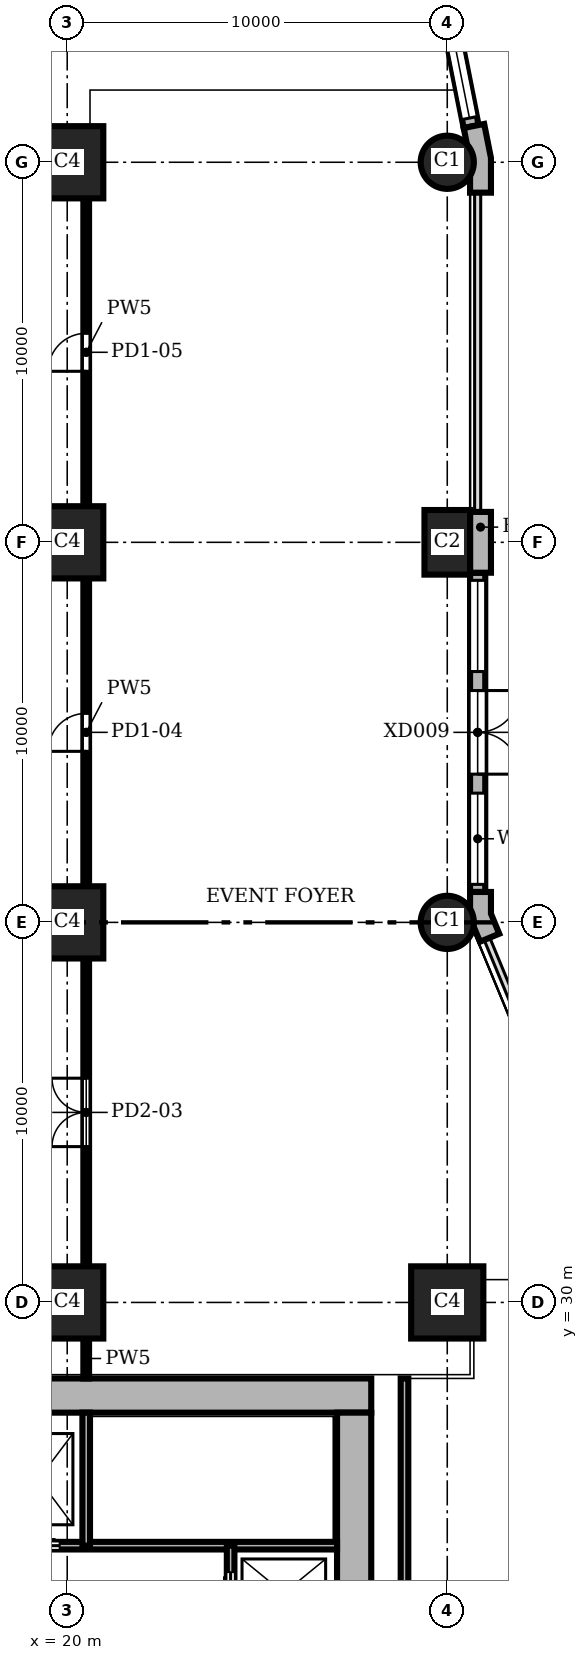
"""IFC4 building model, lengths in metres.
Left out: names, types, materials, properties, quantities, classifications, styles, units other than length and angle.
Written with IfcOpenShell. Run it as: python <this file> out.ifc"""

import sys

from ifc_helpers import new_model, si_unit, direction, frame, frame_2d, origin, origin_2d, place, context, subcontext, project, spatial, polyline, rectangle, circle, outline, extrude, element, fill, save


model = new_model("IFC4")
c1 = context("Model", 3, precision=1e-05, world=origin(), true_north=direction((0.0, 1.0)))
c2 = subcontext(c1, "Body", "Model", "MODEL_VIEW")
j1 = project(units=[si_unit("LENGTHUNIT", "METRE"), si_unit("PLANEANGLEUNIT", "RADIAN")], contexts=[c1])
p1 = place(None, origin())
s1 = spatial("IfcSite", under=j1, at=p1, CompositionType="ELEMENT")
p2 = place(p1, origin())
s2 = spatial("IfcBuilding", under=s1, at=p2, CompositionType="ELEMENT")
p3 = place(p2, frame((0.0, 0.0, 6.0)))
s3 = spatial("IfcBuildingStorey", under=s2, at=p3, CompositionType="ELEMENT", Elevation=6.0)
p4 = place(p3, frame((30.0, 40.0, 0.0), z_axis=(0.0, 0.0, 1.0), x_axis=(1.0, 0.0, 0.0)))
e1 = element("IfcColumn", 1, at=p4, inside=s3, PredefinedType="COLUMN", context=c2, shape_type="SweptSolid", body=[
    extrude(circle(Radius=0.7, at=origin_2d()), origin(), (0.0, 0.0, 1.0), 6.0),
])
p5 = place(p3, frame((30.0, 50.0, 0.0), z_axis=(0.0, 0.0, 1.0), x_axis=(0.0, 1.0, 0.0)))
e2 = element("IfcColumn", 2, at=p5, inside=s3, PredefinedType="COLUMN", context=c2, shape_type="SweptSolid", body=[
    extrude(rectangle(XDim=1.7, YDim=1.2, at=origin_2d()), origin(), (0.0, 0.0, 1.0), 6.0),
])
p6 = place(p3, frame((30.0, 60.0, 0.0), z_axis=(0.0, 0.0, 1.0), x_axis=(1.0, 0.0, 0.0)))
e3 = element("IfcColumn", 3, at=p6, inside=s3, PredefinedType="COLUMN", context=c2, shape_type="SweptSolid", body=[
    extrude(circle(Radius=0.7, at=origin_2d()), origin(), (0.0, 0.0, 1.0), 6.0),
])
for number, where, z_axis, x_axis in (
    (4, (20.0, 30.0, 0.0), (0.0, 0.0, 1.0), (1.0, 0.0, 0.0)),
    (5, (20.0, 40.0, 0.0), (0.0, 0.0, 1.0), (1.0, 0.0, 0.0)),
    (6, (20.0, 50.0, 0.0), (0.0, 0.0, 1.0), (1.0, 0.0, 0.0)),
    (7, (20.0, 60.0, 0.0), (0.0, 0.0, 1.0), (1.0, 0.0, 0.0)),
    (8, (30.0, 30.0, 0.0), (0.0, 0.0, 1.0), (1.0, 0.0, 0.0)),
):
    element("IfcColumn", number, at=place(p3, frame(where, z_axis=z_axis, x_axis=x_axis)), inside=s3, PredefinedType="COLUMN", context=c2, shape_type="SweptSolid", body=[
        extrude(rectangle(XDim=1.9, YDim=1.9, at=origin_2d()), origin(), (0.0, 0.0, 1.0), 6.0),
    ])
p7 = place(p3, frame((27.55, 8.9, 0.0), z_axis=(0.0, 0.0, 1.0), x_axis=(0.0, 1.0, 0.0)))
e9 = element("IfcWall", 9, at=p7, inside=s3, PredefinedType="SHEAR", context=c2, shape_type="SweptSolid", body=[
    extrude(rectangle(XDim=18.2, YDim=0.9, at=frame_2d((9.1, 0.0))), origin(), (0.0, 0.0, 1.0), 6.0),
])
p8 = place(p7, frame((4.55, 0.0, 0.0)))
e10 = element("IfcOpeningElement", 10, at=p8, cuts=e9, PredefinedType="OPENING", context=c2, shape_type="SweptSolid", body=[
    extrude(rectangle(XDim=1.6, YDim=2.1, at=frame_2d((0.8, 1.05))), frame((0.0, 0.46, 0.0), z_axis=(0.0, -1.0, 0.0), x_axis=(1.0, 0.0, 0.0)), (0.0, 0.0, 1.0), 0.92),
])
p9 = place(p3, frame((28.0, 27.55, 0.0), z_axis=(0.0, 0.0, 1.0), x_axis=(-1.0, 0.0, 0.0)))
e11 = element("IfcWall", 11, at=p9, inside=s3, PredefinedType="SHEAR", context=c2, shape_type="SweptSolid", body=[
    extrude(rectangle(XDim=20.0, YDim=0.9, at=frame_2d((10.0, 0.0))), origin(), (0.0, 0.0, 1.0), 6.0),
])
p10 = place(p3, origin())
e12 = element("IfcWall", 12, at=p10, inside=s3, PredefinedType="SOLIDWALL", context=c2, shape_type="SweptSolid", body=[
    extrude(outline(polyline([(31.23, 39.644), (31.369, 39.701), (31.15, 40.229), (31.15, 40.8), (31.0, 40.8), (30.6, 40.8), (30.6, 40.119), (30.861, 39.49), (31.23, 39.644)])), origin(), (0.0, 0.0, 1.0), 6.0),
])
e13 = element("IfcWall", 13, at=p10, inside=s3, PredefinedType="SOLIDWALL", context=c2, shape_type="SweptSolid", body=[
    extrude(outline(polyline([(31.0, 49.2), (31.15, 49.2), (31.15, 50.0), (31.15, 50.8), (31.0, 50.8), (30.6, 50.8), (30.6, 50.0), (30.6, 49.2), (31.0, 49.2)])), origin(), (0.0, 0.0, 1.0), 6.0),
])
e14 = element("IfcWall", 14, at=p10, inside=s3, PredefinedType="SOLIDWALL", context=c2, shape_type="SweptSolid", body=[
    extrude(outline(polyline([(31.0, 59.2), (31.15, 59.2), (31.15, 60.113), (30.972, 61.009), (30.825, 60.98), (30.432, 60.902), (30.6, 60.059), (30.6, 59.2), (31.0, 59.2)])), origin(), (0.0, 0.0, 1.0), 6.0),
])
p11 = place(p3, frame((30.8, 40.8, 0.0), z_axis=(0.0, 0.0, 1.0), x_axis=(0.0, 1.0, 0.0)))
e15 = element("IfcWall", 15, at=p11, inside=s3, PredefinedType="SOLIDWALL", context=c2, shape_type="SweptSolid", body=[
    extrude(rectangle(XDim=8.4, YDim=0.4, at=frame_2d((4.2, 0.0))), origin(), (0.0, 0.0, 1.0), 6.0),
])
p12 = place(p11, frame((0.2, 0.0, 0.9)))
e16 = element("IfcOpeningElement", 16, at=p12, cuts=e15, PredefinedType="OPENING", context=c2, shape_type="SweptSolid", body=[
    extrude(rectangle(XDim=2.4, YDim=4.4, at=frame_2d((1.2, 2.2))), frame((0.0, 0.21, 0.0), z_axis=(0.0, -1.0, 0.0), x_axis=(1.0, 0.0, 0.0)), (0.0, 0.0, 1.0), 0.42),
])
p13 = place(p11, frame((3.1, 0.0, 0.0)))
e17 = element("IfcOpeningElement", 17, at=p13, cuts=e15, PredefinedType="OPENING", context=c2, shape_type="SweptSolid", body=[
    extrude(rectangle(XDim=2.2, YDim=2.4, at=frame_2d((1.1, 1.2))), frame((0.0, 0.21, 0.0), z_axis=(0.0, -1.0, 0.0), x_axis=(1.0, 0.0, 0.0)), (0.0, 0.0, 1.0), 0.42),
])
p14 = place(p11, frame((5.8, 0.0, 0.9)))
e18 = element("IfcOpeningElement", 18, at=p14, cuts=e15, PredefinedType="OPENING", context=c2, shape_type="SweptSolid", body=[
    extrude(rectangle(XDim=2.4, YDim=4.4, at=frame_2d((1.2, 2.2))), frame((0.0, 0.21, 0.0), z_axis=(0.0, -1.0, 0.0), x_axis=(1.0, 0.0, 0.0)), (0.0, 0.0, 1.0), 0.42),
])
p15 = place(p3, frame((30.629, 60.941, 0.0), z_axis=(0.0, 0.0, 1.0), x_axis=(-0.195098533057, 0.98078364709, 0.0)))
e19 = element("IfcWall", 19, at=p15, inside=s3, PredefinedType="SOLIDWALL", context=c2, shape_type="SweptSolid", body=[
    extrude(rectangle(XDim=4.753, YDim=0.4, at=frame_2d((2.376, 0.0))), origin(), (0.0, 0.0, 1.0), 6.0),
])
p16 = place(p15, frame((0.226, 0.0, 0.9)))
e20 = element("IfcOpeningElement", 20, at=p16, cuts=e19, PredefinedType="OPENING", context=c2, shape_type="SweptSolid", body=[
    extrude(rectangle(XDim=4.3, YDim=4.4, at=frame_2d((2.15, 2.2))), frame((0.0, 0.21, 0.0), z_axis=(0.0, -1.0, 0.0), x_axis=(1.0, 0.0, 0.0)), (0.0, 0.0, 1.0), 0.42),
])
p17 = place(p3, frame((13.8, 23.6, 0.0), z_axis=(0.0, 0.0, 1.0), x_axis=(1.0, 0.0, 0.0)))
e21 = element("IfcWall", 21, at=p17, inside=s3, PredefinedType="SHEAR", context=c2, shape_type="SweptSolid", body=[
    extrude(rectangle(XDim=13.3, YDim=0.2, at=frame_2d((6.65, 0.0))), origin(), (0.0, 0.0, 1.0), 5.68),
])
p18 = place(p17, frame((2.4, 0.0, 0.0)))
e22 = element("IfcOpeningElement", 22, at=p18, cuts=e21, PredefinedType="OPENING", context=c2, shape_type="SweptSolid", body=[
    extrude(rectangle(XDim=1.1, YDim=2.1, at=frame_2d((0.55, 1.05))), frame((0.0, 0.11, 0.0), z_axis=(0.0, -1.0, 0.0), x_axis=(1.0, 0.0, 0.0)), (0.0, 0.0, 1.0), 0.22),
])
p19 = place(p17, frame((4.9, 0.0, 0.0)))
e23 = element("IfcOpeningElement", 23, at=p19, cuts=e21, PredefinedType="OPENING", context=c2, shape_type="SweptSolid", body=[
    extrude(rectangle(XDim=1.1, YDim=2.1, at=frame_2d((0.55, 1.05))), frame((0.0, 0.11, 0.0), z_axis=(0.0, -1.0, 0.0), x_axis=(1.0, 0.0, 0.0)), (0.0, 0.0, 1.0), 0.22),
])
p20 = place(p17, frame((0.25, 0.0, 0.0)))
e24 = element("IfcOpeningElement", 24, at=p20, cuts=e21, PredefinedType="OPENING", context=c2, shape_type="SweptSolid", body=[
    extrude(rectangle(XDim=1.0, YDim=2.1, at=frame_2d((0.5, 1.05))), frame((0.0, 0.11, 0.0), z_axis=(0.0, -1.0, 0.0), x_axis=(1.0, 0.0, 0.0)), (0.0, 0.0, 1.0), 0.22),
])
p21 = place(p3, frame((20.5, 23.6, 0.0), z_axis=(0.0, 0.0, 1.0), x_axis=(0.0, 1.0, 0.0)))
e25 = element("IfcWall", 25, at=p21, inside=s3, PredefinedType="SHEAR", context=c2, shape_type="SweptSolid", body=[
    extrude(rectangle(XDim=3.5, YDim=0.2, at=frame_2d((1.75, 0.0))), origin(), (0.0, 0.0, 1.0), 5.68),
])
p22 = place(p3, frame((24.3, 16.1, 0.0), z_axis=(0.0, 0.0, 1.0), x_axis=(0.0, 1.0, 0.0)))
e26 = element("IfcWall", 26, at=p22, inside=s3, PredefinedType="SHEAR", context=c2, shape_type="SweptSolid", body=[
    extrude(rectangle(XDim=7.5, YDim=0.2, at=frame_2d((3.75, 0.0))), origin(), (0.0, 0.0, 1.0), 5.68),
])
p23 = place(p22, frame((5.7, 0.0, 0.0)))
e27 = element("IfcOpeningElement", 27, at=p23, cuts=e26, PredefinedType="OPENING", context=c2, shape_type="SweptSolid", body=[
    extrude(rectangle(XDim=1.1, YDim=2.1, at=frame_2d((0.55, 1.05))), frame((0.0, 0.11, 0.0), z_axis=(0.0, -1.0, 0.0), x_axis=(1.0, 0.0, 0.0)), (0.0, 0.0, 1.0), 0.22),
])
p24 = place(p3, frame((28.875, 16.5, 0.0), z_axis=(0.0, 0.0, 1.0), x_axis=(0.0, 1.0, 0.0)))
e28 = element("IfcWall", 28, at=p24, inside=s3, PredefinedType="PARTITIONING", context=c2, shape_type="SweptSolid", body=[
    extrude(rectangle(XDim=11.5, YDim=0.2, at=frame_2d((5.75, 0.0))), origin(), (0.0, 0.0, 1.0), 5.68),
])
p25 = place(p3, frame((20.5, 28.0, 0.0), z_axis=(0.0, 0.0, 1.0), x_axis=(0.0, 1.0, 0.0)))
e29 = element("IfcWall", 29, at=p25, inside=s3, PredefinedType="PARTITIONING", context=c2, shape_type="SweptSolid", body=[
    extrude(rectangle(XDim=1.05, YDim=0.15, at=frame_2d((0.525, 0.0))), origin(), (0.0, 0.0, 1.0), 5.68),
])
p26 = place(p3, frame((20.5, 30.95, 0.0), z_axis=(0.0, 0.0, 1.0), x_axis=(0.0, 1.0, 0.0)))
e30 = element("IfcWall", 30, at=p26, inside=s3, PredefinedType="PARTITIONING", context=c2, shape_type="SweptSolid", body=[
    extrude(rectangle(XDim=8.1, YDim=0.15, at=frame_2d((4.05, 0.0))), origin(), (0.0, 0.0, 1.0), 5.68),
])
p27 = place(p26, frame((3.15, 0.0, 0.0)))
e31 = element("IfcOpeningElement", 31, at=p27, cuts=e30, PredefinedType="OPENING", context=c2, shape_type="SweptSolid", body=[
    extrude(rectangle(XDim=1.8, YDim=2.1, at=frame_2d((0.9, 1.05))), frame((0.0, 0.085, 0.0), z_axis=(0.0, -1.0, 0.0), x_axis=(1.0, 0.0, 0.0)), (0.0, 0.0, 1.0), 0.17),
])
p28 = place(p3, frame((20.5, 40.95, 0.0), z_axis=(0.0, 0.0, 1.0), x_axis=(0.0, 1.0, 0.0)))
e32 = element("IfcWall", 32, at=p28, inside=s3, PredefinedType="PARTITIONING", context=c2, shape_type="SweptSolid", body=[
    extrude(rectangle(XDim=8.1, YDim=0.15, at=frame_2d((4.05, 0.0))), origin(), (0.0, 0.0, 1.0), 5.68),
])
p29 = place(p28, frame((3.55, 0.0, 0.0)))
e33 = element("IfcOpeningElement", 33, at=p29, cuts=e32, PredefinedType="OPENING", context=c2, shape_type="SweptSolid", body=[
    extrude(rectangle(XDim=1.0, YDim=2.1, at=frame_2d((0.5, 1.05))), frame((0.0, 0.085, 0.0), z_axis=(0.0, -1.0, 0.0), x_axis=(1.0, 0.0, 0.0)), (0.0, 0.0, 1.0), 0.17),
])
p30 = place(p3, frame((20.5, 50.95, 0.0), z_axis=(0.0, 0.0, 1.0), x_axis=(0.0, 1.0, 0.0)))
e34 = element("IfcWall", 34, at=p30, inside=s3, PredefinedType="PARTITIONING", context=c2, shape_type="SweptSolid", body=[
    extrude(rectangle(XDim=8.1, YDim=0.15, at=frame_2d((4.05, 0.0))), origin(), (0.0, 0.0, 1.0), 5.68),
])
p31 = place(p30, frame((3.55, 0.0, 0.0)))
e35 = element("IfcOpeningElement", 35, at=p31, cuts=e34, PredefinedType="OPENING", context=c2, shape_type="SweptSolid", body=[
    extrude(rectangle(XDim=1.0, YDim=2.1, at=frame_2d((0.5, 1.05))), frame((0.0, 0.085, 0.0), z_axis=(0.0, -1.0, 0.0), x_axis=(1.0, 0.0, 0.0)), (0.0, 0.0, 1.0), 0.17),
])
p32 = place(p12, origin())
e36 = element("IfcWindow", 36, at=p32, inside=s3, PartitioningType="SINGLE_PANEL", PredefinedType="WINDOW", context=c2, shape_type="SweptSolid", body=[
    extrude(rectangle(XDim=2.4, YDim=4.4, at=frame_2d((1.2, 2.2))), frame((0.0, 0.16, 0.0), z_axis=(0.0, -1.0, 0.0), x_axis=(1.0, 0.0, 0.0)), (0.0, 0.0, 1.0), 0.06),
])
fill(e16, e36)
p33 = place(p13, frame((2.2, 0.0, 0.0), z_axis=(0.0, 0.0, 1.0), x_axis=(-1.0, 0.0, 0.0)))
e37 = element("IfcDoor", 37, at=p33, inside=s3, OperationType="DOUBLE_DOOR_DOUBLE_SWING", PredefinedType="DOOR", context=c2, shape_type="SweptSolid", body=[
    extrude(rectangle(XDim=2.2, YDim=2.4, at=frame_2d((1.1, 1.2))), frame((0.0, 0.025, 0.0), z_axis=(0.0, -1.0, 0.0), x_axis=(1.0, 0.0, 0.0)), (0.0, 0.0, 1.0), 0.05),
])
fill(e17, e37)
p34 = place(p14, origin())
e38 = element("IfcWindow", 38, at=p34, inside=s3, PartitioningType="SINGLE_PANEL", PredefinedType="WINDOW", context=c2, shape_type="SweptSolid", body=[
    extrude(rectangle(XDim=2.4, YDim=4.4, at=frame_2d((1.2, 2.2))), frame((0.0, 0.16, 0.0), z_axis=(0.0, -1.0, 0.0), x_axis=(1.0, 0.0, 0.0)), (0.0, 0.0, 1.0), 0.06),
])
fill(e18, e38)
p35 = place(p16, origin())
e39 = element("IfcWindow", 39, at=p35, inside=s3, PartitioningType="SINGLE_PANEL", PredefinedType="WINDOW", context=c2, shape_type="SweptSolid", body=[
    extrude(rectangle(XDim=4.3, YDim=4.4, at=frame_2d((2.15, 2.2))), frame((0.0, 0.16, 0.0), z_axis=(0.0, -1.0, 0.0), x_axis=(1.0, 0.0, 0.0)), (0.0, 0.0, 1.0), 0.06),
])
fill(e20, e39)
p36 = place(p23, origin())
e40 = element("IfcDoor", 40, at=p36, inside=s3, OperationType="DOUBLE_DOOR_SLIDING", PredefinedType="DOOR", context=c2, shape_type="SweptSolid", body=[
    extrude(rectangle(XDim=1.1, YDim=2.1, at=frame_2d((0.55, 1.05))), frame((0.0, 0.025, 0.0), z_axis=(0.0, -1.0, 0.0), x_axis=(1.0, 0.0, 0.0)), (0.0, 0.0, 1.0), 0.05),
])
fill(e27, e40)
p37 = place(p19, origin())
e41 = element("IfcDoor", 41, at=p37, inside=s3, OperationType="DOUBLE_DOOR_SLIDING", PredefinedType="DOOR", context=c2, shape_type="SweptSolid", body=[
    extrude(rectangle(XDim=1.1, YDim=2.1, at=frame_2d((0.55, 1.05))), frame((0.0, 0.025, 0.0), z_axis=(0.0, -1.0, 0.0), x_axis=(1.0, 0.0, 0.0)), (0.0, 0.0, 1.0), 0.05),
])
fill(e23, e41)
p38 = place(p27, origin())
e42 = element("IfcDoor", 42, at=p38, inside=s3, OperationType="DOUBLE_DOOR_SINGLE_SWING", PredefinedType="DOOR", context=c2, shape_type="SweptSolid", body=[
    extrude(rectangle(XDim=1.8, YDim=2.1, at=frame_2d((0.9, 1.05))), frame((0.0, 0.025, 0.0), z_axis=(0.0, -1.0, 0.0), x_axis=(1.0, 0.0, 0.0)), (0.0, 0.0, 1.0), 0.05),
])
fill(e31, e42)
p39 = place(p29, origin())
e43 = element("IfcDoor", 43, at=p39, inside=s3, OperationType="SINGLE_SWING_LEFT", PredefinedType="DOOR", context=c2, shape_type="SweptSolid", body=[
    extrude(rectangle(XDim=1.0, YDim=2.1, at=frame_2d((0.5, 1.05))), frame((0.0, 0.025, 0.0), z_axis=(0.0, -1.0, 0.0), x_axis=(1.0, 0.0, 0.0)), (0.0, 0.0, 1.0), 0.05),
])
fill(e33, e43)
p40 = place(p31, origin())
e44 = element("IfcDoor", 44, at=p40, inside=s3, OperationType="SINGLE_SWING_LEFT", PredefinedType="DOOR", context=c2, shape_type="SweptSolid", body=[
    extrude(rectangle(XDim=1.0, YDim=2.1, at=frame_2d((0.5, 1.05))), frame((0.0, 0.025, 0.0), z_axis=(0.0, -1.0, 0.0), x_axis=(1.0, 0.0, 0.0)), (0.0, 0.0, 1.0), 0.05),
])
fill(e35, e44)
save(model, sys.argv[1])
